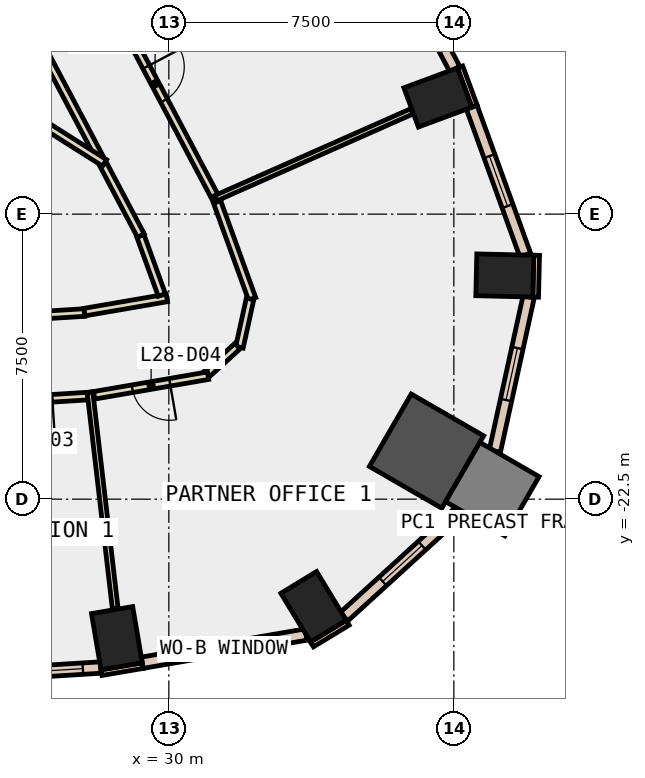
"""IFC4 building model, lengths in metres.
Left out: names, types, materials, properties, quantities, classifications, styles, units other than length and angle.
Written with IfcOpenShell. Run it as: python <this file> out.ifc"""

import sys

from ifc_helpers import new_model, si_unit, direction, frame, frame_2d, origin, origin_2d, place, context, subcontext, project, spatial, rectangle, extrude, element, fill, save


model = new_model("IFC4")
c1 = context("Model", 3, precision=1e-05, world=origin(), true_north=direction((0.0, 1.0)))
c2 = subcontext(c1, "Body", "Model", "MODEL_VIEW")
j1 = project(units=[si_unit("LENGTHUNIT", "METRE"), si_unit("PLANEANGLEUNIT", "RADIAN")], contexts=[c1])
p1 = place(None, origin())
s1 = spatial("IfcSite", under=j1, at=p1, CompositionType="ELEMENT")
p2 = place(p1, origin())
s2 = spatial("IfcBuilding", under=s1, at=p2, CompositionType="ELEMENT")
p3 = place(p2, frame((0.0, 0.0, 128.6)))
s3 = spatial("IfcBuildingStorey", under=s2, at=p3, CompositionType="ELEMENT", Elevation=128.6)
for number, where, z_axis, x_axis in (
    (1, (28.633, -26.158, -0.4), (0.0, 0.0, 1.0), (0.986, 0.168, 0.0)),
    (2, (33.808, -25.331, -0.4), (0.0, 0.0, 1.0), (0.854, 0.52, 0.0)),
):
    element("IfcColumn", number, at=place(p3, frame(where, z_axis=z_axis, x_axis=x_axis)), inside=s3, PredefinedType="COLUMN", context=c2, shape_type="SweptSolid", body=[
        extrude(rectangle(XDim=1.1, YDim=1.5, at=origin_2d()), origin(), (0.0, 0.0, 1.0), 4.0),
    ])
p4 = place(p3, frame((36.781, -21.236, -0.4), z_axis=(0.0, 0.0, 1.0), x_axis=(-0.866025403784, 0.5, 0.0)))
e3 = element("IfcColumn", 3, at=p4, inside=s3, PredefinedType="COLUMN", context=c2, shape_type="SweptSolid", body=[
    extrude(rectangle(XDim=2.2, YDim=2.2, at=origin_2d()), origin(), (0.0, 0.0, 1.0), 4.0),
])
for number, where, z_axis, x_axis in (
    (4, (38.841, -16.614, -0.4), (0.0, 0.0, 1.0), (0.023, 1.0, 0.0)),
    (5, (37.08, -11.931, -0.4), (0.0, 0.0, 1.0), (-0.347, 0.938, 0.0)),
):
    element("IfcColumn", number, at=place(p3, frame(where, z_axis=z_axis, x_axis=x_axis)), inside=s3, PredefinedType="COLUMN", context=c2, shape_type="SweptSolid", body=[
        extrude(rectangle(XDim=1.1, YDim=1.5, at=origin_2d()), origin(), (0.0, 0.0, 1.0), 4.0),
    ])
p5 = place(p3, frame((38.513, -22.236, -0.4), z_axis=(0.0, 0.0, 1.0), x_axis=(-0.866025403784, 0.5, 0.0)))
e6 = element("IfcColumn", 6, at=p5, inside=s3, PredefinedType="COLUMN", context=c2, shape_type="SweptSolid", body=[
    extrude(rectangle(XDim=1.8, YDim=1.8, at=origin_2d()), origin(), (0.0, 0.0, 1.0), 4.0),
])
p6 = place(p3, frame((38.045, -12.16, 0.0), z_axis=(0.0, 0.0, 1.0), x_axis=(-0.347010833361, 0.937861120598, 0.0)))
e7 = element("IfcWall", 7, at=p6, inside=s3, PredefinedType="STANDARD", context=c2, shape_type="SweptSolid", body=[
    extrude(rectangle(XDim=1.1, YDim=0.15, at=frame_2d((0.55, 0.0))), origin(), (0.0, 0.0, 1.0), 3.6),
])
p7 = place(p3, frame((28.229, -27.064, 0.0), z_axis=(0.0, 0.0, 1.0), x_axis=(0.985763338892, 0.168138751323, 0.0)))
e8 = element("IfcWall", 8, at=p7, inside=s3, PredefinedType="STANDARD", context=c2, shape_type="SweptSolid", body=[
    extrude(rectangle(XDim=1.101, YDim=0.15, at=frame_2d((0.55, 0.0))), origin(), (0.0, 0.0, 1.0), 3.6),
])
for number, where, z_axis, x_axis in (
    (9, (33.767, -26.322, 0.0), (0.0, 0.0, 1.0), (0.854, 0.52, 0.0)),
    (10, (39.653, -17.183, 0.0), (0.0, 0.0, 1.0), (0.024, 1.0, 0.0)),
):
    element("IfcWall", number, at=place(p3, frame(where, z_axis=z_axis, x_axis=x_axis)), inside=s3, PredefinedType="STANDARD", context=c2, shape_type="SweptSolid", body=[
        extrude(rectangle(XDim=1.1, YDim=0.15, at=frame_2d((0.55, 0.0))), origin(), (0.0, 0.0, 1.0), 3.6),
    ])
p8 = place(p3, frame((22.332, -27.294, 0.0), z_axis=(0.0, 0.0, 1.0), x_axis=(0.998086636664, 0.061830944626, 0.0)))
e11 = element("IfcWall", 11, at=p8, inside=s3, PredefinedType="STANDARD", context=c2, shape_type="SweptSolid", body=[
    extrude(rectangle(XDim=5.887, YDim=0.3, at=frame_2d((2.944, 0.0))), origin(), (0.0, 0.0, 1.0), 3.6),
])
p9 = place(p8, frame((0.472, 0.0, 0.9)))
e12 = element("IfcOpeningElement", 12, at=p9, cuts=e11, PredefinedType="OPENING", context=c2, shape_type="SweptSolid", body=[
    extrude(rectangle(XDim=2.0, YDim=2.6, at=frame_2d((1.0, 1.3))), frame((0.0, 0.16, 0.0), z_axis=(0.0, -1.0, 0.0), x_axis=(1.0, 0.0, 0.0)), (0.0, 0.0, 1.0), 0.32),
])
p10 = place(p8, frame((3.415, 0.0, 0.9)))
e13 = element("IfcOpeningElement", 13, at=p10, cuts=e11, PredefinedType="OPENING", context=c2, shape_type="SweptSolid", body=[
    extrude(rectangle(XDim=2.0, YDim=2.6, at=frame_2d((1.0, 1.3))), frame((0.0, 0.16, 0.0), z_axis=(0.0, -1.0, 0.0), x_axis=(1.0, 0.0, 0.0)), (0.0, 0.0, 1.0), 0.32),
])
p11 = place(p3, frame((29.3, -26.804, 0.0), z_axis=(0.0, 0.0, 1.0), x_axis=(0.985504881957, 0.169647067875, 0.0)))
e14 = element("IfcWall", 14, at=p11, inside=s3, PredefinedType="STANDARD", context=c2, shape_type="SweptSolid", body=[
    extrude(rectangle(XDim=4.374, YDim=0.3, at=frame_2d((2.187, 0.0))), origin(), (0.0, 0.0, 1.0), 3.6),
])
p12 = place(p11, frame((1.487, 0.0, 0.9)))
e15 = element("IfcOpeningElement", 15, at=p12, cuts=e14, PredefinedType="OPENING", context=c2, shape_type="SweptSolid", body=[
    extrude(rectangle(XDim=1.4, YDim=2.6, at=frame_2d((0.7, 1.3))), frame((0.0, 0.16, 0.0), z_axis=(0.0, -1.0, 0.0), x_axis=(1.0, 0.0, 0.0)), (0.0, 0.0, 1.0), 0.32),
])
p13 = place(p3, frame((34.61, -25.593, 0.0), z_axis=(0.0, 0.0, 1.0), x_axis=(0.738825046606, 0.673897284835, 0.0)))
e16 = element("IfcWall", 16, at=p13, inside=s3, PredefinedType="STANDARD", context=c2, shape_type="SweptSolid", body=[
    extrude(rectangle(XDim=4.155, YDim=0.3, at=frame_2d((2.078, 0.0))), origin(), (0.0, 0.0, 1.0), 3.6),
])
p14 = place(p13, frame((1.378, 0.0, 0.9)))
e17 = element("IfcOpeningElement", 17, at=p14, cuts=e16, PredefinedType="OPENING", context=c2, shape_type="SweptSolid", body=[
    extrude(rectangle(XDim=1.4, YDim=2.6, at=frame_2d((0.7, 1.3))), frame((0.0, 0.16, 0.0), z_axis=(0.0, -1.0, 0.0), x_axis=(1.0, 0.0, 0.0)), (0.0, 0.0, 1.0), 0.32),
])
p15 = place(p3, frame((38.579, -21.236, 0.0), z_axis=(0.0, 0.0, 1.0), x_axis=(0.2139737857, 0.976839402887, 0.0)))
e18 = element("IfcWall", 18, at=p15, inside=s3, PredefinedType="STANDARD", context=c2, shape_type="SweptSolid", body=[
    extrude(rectangle(XDim=4.154, YDim=0.3, at=frame_2d((2.077, 0.0))), origin(), (0.0, 0.0, 1.0), 3.6),
])
p16 = place(p15, frame((1.377, 0.0, 0.9)))
e19 = element("IfcOpeningElement", 19, at=p16, cuts=e18, PredefinedType="OPENING", context=c2, shape_type="SweptSolid", body=[
    extrude(rectangle(XDim=1.4, YDim=2.6, at=frame_2d((0.7, 1.3))), frame((0.0, 0.16, 0.0), z_axis=(0.0, -1.0, 0.0), x_axis=(1.0, 0.0, 0.0)), (0.0, 0.0, 1.0), 0.32),
])
p17 = place(p3, frame((39.379, -16.077, 0.0), z_axis=(0.0, 0.0, 1.0), x_axis=(-0.340477955209, 0.940252499075, 0.0)))
e20 = element("IfcWall", 20, at=p17, inside=s3, PredefinedType="STANDARD", context=c2, shape_type="SweptSolid", body=[
    extrude(rectangle(XDim=4.138, YDim=0.3, at=frame_2d((2.069, 0.0))), origin(), (0.0, 0.0, 1.0), 3.6),
])
p18 = place(p17, frame((1.369, 0.0, 0.9)))
e21 = element("IfcOpeningElement", 21, at=p18, cuts=e20, PredefinedType="OPENING", context=c2, shape_type="SweptSolid", body=[
    extrude(rectangle(XDim=1.4, YDim=2.6, at=frame_2d((0.7, 1.3))), frame((0.0, 0.16, 0.0), z_axis=(0.0, -1.0, 0.0), x_axis=(1.0, 0.0, 0.0)), (0.0, 0.0, 1.0), 0.32),
])
p19 = place(p3, frame((37.523, -11.181, 0.0), z_axis=(0.0, 0.0, 1.0), x_axis=(-0.467654949391, 0.883911108828, 0.0)))
e22 = element("IfcWall", 22, at=p19, inside=s3, PredefinedType="STANDARD", context=c2, shape_type="SweptSolid", body=[
    extrude(rectangle(XDim=6.265, YDim=0.3, at=frame_2d((3.133, 0.0))), origin(), (0.0, 0.0, 1.0), 3.6),
])
p20 = place(p19, frame((0.566, 0.0, 0.9)))
e23 = element("IfcOpeningElement", 23, at=p20, cuts=e22, PredefinedType="OPENING", context=c2, shape_type="SweptSolid", body=[
    extrude(rectangle(XDim=2.0, YDim=2.6, at=frame_2d((1.0, 1.3))), frame((0.0, 0.16, 0.0), z_axis=(0.0, -1.0, 0.0), x_axis=(1.0, 0.0, 0.0)), (0.0, 0.0, 1.0), 0.32),
])
p21 = place(p19, frame((3.699, 0.0, 0.9)))
e24 = element("IfcOpeningElement", 24, at=p21, cuts=e22, PredefinedType="OPENING", context=c2, shape_type="SweptSolid", body=[
    extrude(rectangle(XDim=2.0, YDim=2.6, at=frame_2d((1.0, 1.3))), frame((0.0, 0.16, 0.0), z_axis=(0.0, -1.0, 0.0), x_axis=(1.0, 0.0, 0.0)), (0.0, 0.0, 1.0), 0.32),
])
p22 = place(p3, frame((21.218, -17.995, 0.0), z_axis=(0.0, 0.0, 1.0), x_axis=(0.998092528214, 0.061735768594, 0.0)))
e25 = element("IfcWall", 25, at=p22, inside=s3, PredefinedType="PARTITIONING", context=c2, shape_type="SweptSolid", body=[
    extrude(rectangle(XDim=6.576, YDim=0.2, at=frame_2d((3.288, 0.0))), origin(), (0.0, 0.0, 1.0), 3.6),
])
p23 = place(p22, frame((2.788, 0.0, 0.0)))
e26 = element("IfcOpeningElement", 26, at=p23, cuts=e25, PredefinedType="OPENING", context=c2, shape_type="SweptSolid", body=[
    extrude(rectangle(XDim=1.0, YDim=2.1, at=frame_2d((0.5, 1.05))), frame((0.0, 0.11, 0.0), z_axis=(0.0, -1.0, 0.0), x_axis=(1.0, 0.0, 0.0)), (0.0, 0.0, 1.0), 0.22),
])
p24 = place(p3, frame((27.78, -17.578, 0.0), z_axis=(0.0, 0.0, 1.0), x_axis=(0.985534991456, 0.169472064409, 0.0)))
e27 = element("IfcWall", 27, at=p24, inside=s3, PredefinedType="PARTITIONING", context=c2, shape_type="SweptSolid", body=[
    extrude(rectangle(XDim=2.2, YDim=0.2, at=frame_2d((1.1, 0.0))), origin(), (0.0, 0.0, 1.0), 3.6),
])
p25 = place(p3, frame((29.816, -17.128, 0.0), z_axis=(0.0, 0.0, 1.0), x_axis=(-0.340726116699, 0.940162599447, 0.0)))
e28 = element("IfcWall", 28, at=p25, inside=s3, PredefinedType="PARTITIONING", context=c2, shape_type="SweptSolid", body=[
    extrude(rectangle(XDim=1.658, YDim=0.2, at=frame_2d((0.829, 0.0))), origin(), (0.0, 0.0, 1.0), 3.6),
])
p26 = place(p3, frame((29.264, -15.564, 0.0), z_axis=(0.0, 0.0, 1.0), x_axis=(-0.46760771465, 0.883936097917, 0.0)))
e29 = element("IfcWall", 29, at=p26, inside=s3, PredefinedType="PARTITIONING", context=c2, shape_type="SweptSolid", body=[
    extrude(rectangle(XDim=2.123, YDim=0.2, at=frame_2d((1.062, 0.0))), origin(), (0.0, 0.0, 1.0), 3.6),
])
p27 = place(p3, frame((28.177, -13.51, 0.0), z_axis=(0.0, 0.0, 1.0), x_axis=(-0.467580354248, 0.883950571198, 0.0)))
e30 = element("IfcWall", 30, at=p27, inside=s3, PredefinedType="PARTITIONING", context=c2, shape_type="SweptSolid", body=[
    extrude(rectangle(XDim=4.453, YDim=0.2, at=frame_2d((2.227, 0.0))), origin(), (0.0, 0.0, 1.0), 3.6),
])
p28 = place(p3, frame((27.962, -19.782, 0.0), z_axis=(0.0, 0.0, 1.0), x_axis=(-0.998088756763, -0.061796712082, 0.0)))
e31 = element("IfcWall", 31, at=p28, inside=s3, PredefinedType="PARTITIONING", context=c2, shape_type="SweptSolid", body=[
    extrude(rectangle(XDim=3.058, YDim=0.2, at=frame_2d((1.529, 0.0))), origin(), (0.0, 0.0, 1.0), 3.6),
])
p29 = place(p28, frame((1.029, 0.0, 0.0)))
e32 = element("IfcOpeningElement", 32, at=p29, cuts=e31, PredefinedType="OPENING", context=c2, shape_type="SweptSolid", body=[
    extrude(rectangle(XDim=1.0, YDim=2.1, at=frame_2d((0.5, 1.05))), frame((0.0, 0.11, 0.0), z_axis=(0.0, -1.0, 0.0), x_axis=(1.0, 0.0, 0.0)), (0.0, 0.0, 1.0), 0.22),
])
p30 = place(p3, frame((31.268, -14.676, 0.0), z_axis=(0.0, 0.0, 1.0), x_axis=(0.340269739222, -0.940327870782, 0.0)))
e33 = element("IfcWall", 33, at=p30, inside=s3, PredefinedType="PARTITIONING", context=c2, shape_type="SweptSolid", body=[
    extrude(rectangle(XDim=2.715, YDim=0.2, at=frame_2d((1.357, 0.0))), origin(), (0.0, 0.0, 1.0), 3.6),
])
p31 = place(p3, frame((32.137, -17.232, 0.0), z_axis=(0.0, 0.0, 1.0), x_axis=(-0.214289506547, -0.976770191695, 0.0)))
e34 = element("IfcWall", 34, at=p31, inside=s3, PredefinedType="PARTITIONING", context=c2, shape_type="SweptSolid", body=[
    extrude(rectangle(XDim=1.302, YDim=0.2, at=frame_2d((0.651, 0.0))), origin(), (0.0, 0.0, 1.0), 3.6),
])
p32 = place(p3, frame((31.806, -18.473, 0.0), z_axis=(0.0, 0.0, 1.0), x_axis=(-0.739141286173, -0.673550413165, 0.0)))
e35 = element("IfcWall", 35, at=p32, inside=s3, PredefinedType="PARTITIONING", context=c2, shape_type="SweptSolid", body=[
    extrude(rectangle(XDim=1.079, YDim=0.2, at=frame_2d((0.54, 0.0))), origin(), (0.0, 0.0, 1.0), 3.6),
])
p33 = place(p3, frame((31.033, -19.251, 0.0), z_axis=(0.0, 0.0, 1.0), x_axis=(-0.985494394638, -0.169707979005, 0.0)))
e36 = element("IfcWall", 36, at=p33, inside=s3, PredefinedType="PARTITIONING", context=c2, shape_type="SweptSolid", body=[
    extrude(rectangle(XDim=3.041, YDim=0.2, at=frame_2d((1.521, 0.0))), origin(), (0.0, 0.0, 1.0), 3.6),
])
p34 = place(p33, frame((1.021, 0.0, 0.0)))
e37 = element("IfcOpeningElement", 37, at=p34, cuts=e36, PredefinedType="OPENING", context=c2, shape_type="SweptSolid", body=[
    extrude(rectangle(XDim=1.0, YDim=2.1, at=frame_2d((0.5, 1.05))), frame((0.0, 0.11, 0.0), z_axis=(0.0, -1.0, 0.0), x_axis=(1.0, 0.0, 0.0)), (0.0, 0.0, 1.0), 0.22),
])
p35 = place(p3, frame((27.999, -8.469, 0.0), z_axis=(0.0, 0.0, 1.0), x_axis=(0.467683043694, -0.883896244274, 0.0)))
e38 = element("IfcWall", 38, at=p35, inside=s3, PredefinedType="PARTITIONING", context=c2, shape_type="SweptSolid", body=[
    extrude(rectangle(XDim=7.015, YDim=0.2, at=frame_2d((3.508, 0.0))), origin(), (0.0, 0.0, 1.0), 3.6),
])
p36 = place(p35, frame((3.008, 0.0, 0.0)))
e39 = element("IfcOpeningElement", 39, at=p36, cuts=e38, PredefinedType="OPENING", context=c2, shape_type="SweptSolid", body=[
    extrude(rectangle(XDim=1.0, YDim=2.1, at=frame_2d((0.5, 1.05))), frame((0.0, 0.11, 0.0), z_axis=(0.0, -1.0, 0.0), x_axis=(1.0, 0.0, 0.0)), (0.0, 0.0, 1.0), 0.22),
])
p37 = place(p3, frame((20.853, -8.931, 0.0), z_axis=(0.0, 0.0, 1.0), x_axis=(0.844869091455, -0.534973100542, 0.0)))
e40 = element("IfcWall", 40, at=p37, inside=s3, PredefinedType="PARTITIONING", context=c2, shape_type="SweptSolid", body=[
    extrude(rectangle(XDim=8.825, YDim=0.2, at=frame_2d((4.413, 0.0))), origin(), (0.0, 0.0, 1.0), 3.6),
])
p38 = place(p3, frame((27.925, -19.684, 0.0), z_axis=(0.0, 0.0, 1.0), x_axis=(0.115888394456, -0.993262241319, 0.0)))
e41 = element("IfcWall", 41, at=p38, inside=s3, PredefinedType="PARTITIONING", context=c2, shape_type="SweptSolid", body=[
    extrude(rectangle(XDim=5.739, YDim=0.15, at=frame_2d((2.869, 0.0))), origin(), (0.0, 0.0, 1.0), 3.6),
])
p39 = place(p3, frame((31.233, -14.582, 0.0), z_axis=(0.0, 0.0, 1.0), x_axis=(0.914317360249, 0.404998474994, 0.0)))
e42 = element("IfcWall", 42, at=p39, inside=s3, PredefinedType="PARTITIONING", context=c2, shape_type="SweptSolid", body=[
    extrude(rectangle(XDim=5.645, YDim=0.15, at=frame_2d((2.822, 0.0))), origin(), (0.0, 0.0, 1.0), 3.6),
])
p40 = place(p10, origin())
e43 = element("IfcWindow", 43, at=p40, inside=s3, PartitioningType="SINGLE_PANEL", PredefinedType="WINDOW", context=c2, shape_type="SweptSolid", body=[
    extrude(rectangle(XDim=2.0, YDim=2.6, at=frame_2d((1.0, 1.3))), frame((0.0, 0.03, 0.0), z_axis=(0.0, -1.0, 0.0), x_axis=(1.0, 0.0, 0.0)), (0.0, 0.0, 1.0), 0.06),
])
fill(e13, e43)
p41 = place(p12, origin())
e44 = element("IfcWindow", 44, at=p41, inside=s3, PartitioningType="SINGLE_PANEL", PredefinedType="WINDOW", context=c2, shape_type="SweptSolid", body=[
    extrude(rectangle(XDim=1.4, YDim=2.6, at=frame_2d((0.7, 1.3))), frame((0.0, 0.03, 0.0), z_axis=(0.0, -1.0, 0.0), x_axis=(1.0, 0.0, 0.0)), (0.0, 0.0, 1.0), 0.06),
])
fill(e15, e44)
p42 = place(p14, origin())
e45 = element("IfcWindow", 45, at=p42, inside=s3, PartitioningType="SINGLE_PANEL", PredefinedType="WINDOW", context=c2, shape_type="SweptSolid", body=[
    extrude(rectangle(XDim=1.4, YDim=2.6, at=frame_2d((0.7, 1.3))), frame((0.0, 0.03, 0.0), z_axis=(0.0, -1.0, 0.0), x_axis=(1.0, 0.0, 0.0)), (0.0, 0.0, 1.0), 0.06),
])
fill(e17, e45)
p43 = place(p16, origin())
e46 = element("IfcWindow", 46, at=p43, inside=s3, PartitioningType="SINGLE_PANEL", PredefinedType="WINDOW", context=c2, shape_type="SweptSolid", body=[
    extrude(rectangle(XDim=1.4, YDim=2.6, at=frame_2d((0.7, 1.3))), frame((0.0, 0.03, 0.0), z_axis=(0.0, -1.0, 0.0), x_axis=(1.0, 0.0, 0.0)), (0.0, 0.0, 1.0), 0.06),
])
fill(e19, e46)
p44 = place(p18, origin())
e47 = element("IfcWindow", 47, at=p44, inside=s3, PartitioningType="SINGLE_PANEL", PredefinedType="WINDOW", context=c2, shape_type="SweptSolid", body=[
    extrude(rectangle(XDim=1.4, YDim=2.6, at=frame_2d((0.7, 1.3))), frame((0.0, 0.03, 0.0), z_axis=(0.0, -1.0, 0.0), x_axis=(1.0, 0.0, 0.0)), (0.0, 0.0, 1.0), 0.06),
])
fill(e21, e47)
p45 = place(p34, origin())
e48 = element("IfcDoor", 48, at=p45, inside=s3, OperationType="SINGLE_SWING_LEFT", PredefinedType="DOOR", context=c2, shape_type="SweptSolid", body=[
    extrude(rectangle(XDim=1.0, YDim=2.1, at=frame_2d((0.5, 1.05))), frame((0.0, 0.025, 0.0), z_axis=(0.0, -1.0, 0.0), x_axis=(1.0, 0.0, 0.0)), (0.0, 0.0, 1.0), 0.05),
])
fill(e37, e48)
p46 = place(p36, origin())
e49 = element("IfcDoor", 49, at=p46, inside=s3, OperationType="SINGLE_SWING_LEFT", PredefinedType="DOOR", context=c2, shape_type="SweptSolid", body=[
    extrude(rectangle(XDim=1.0, YDim=2.1, at=frame_2d((0.5, 1.05))), frame((0.0, 0.025, 0.0), z_axis=(0.0, -1.0, 0.0), x_axis=(1.0, 0.0, 0.0)), (0.0, 0.0, 1.0), 0.05),
])
fill(e39, e49)
save(model, sys.argv[1])
